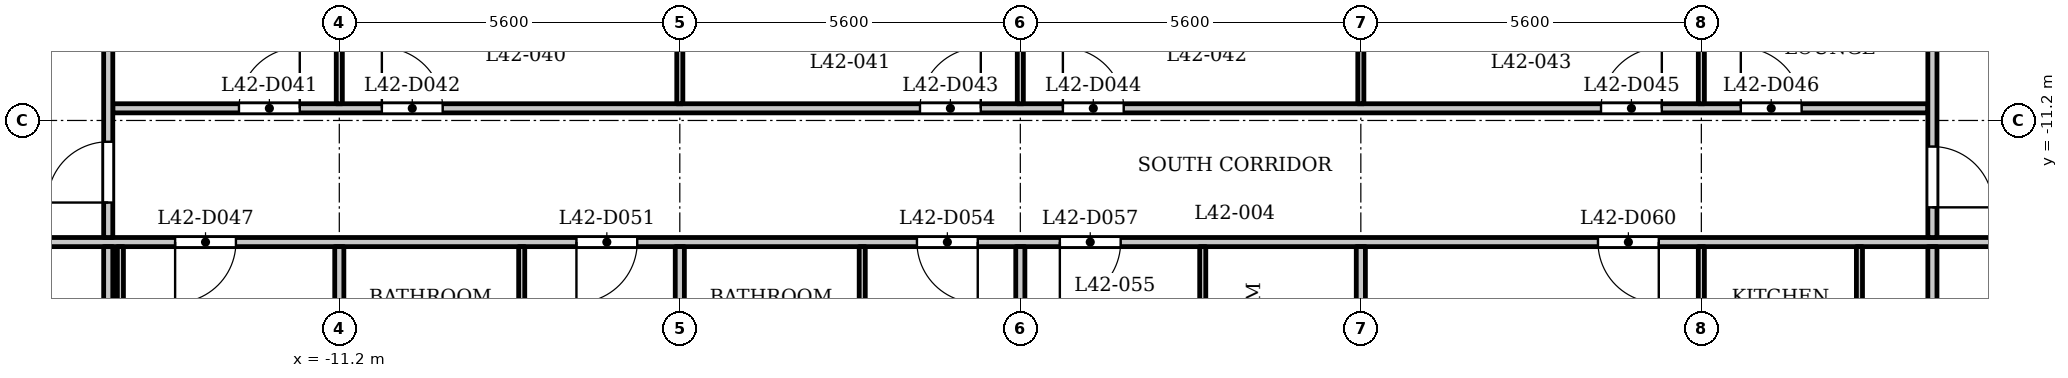
"""IFC4 building model, lengths in metres.
Left out: names, types, materials, properties, quantities, classifications, styles, units other than length and angle.
Written with IfcOpenShell. Run it as: python <this file> out.ifc"""

import sys

from ifc_helpers import new_model, si_unit, direction, frame, frame_2d, origin, place, context, subcontext, project, spatial, rectangle, extrude, element, fill, save


model = new_model("IFC4")
c1 = context("Model", 3, precision=1e-05, world=origin(), true_north=direction((0.0, 1.0)))
c2 = subcontext(c1, "Body", "Model", "MODEL_VIEW")
j1 = project(units=[si_unit("LENGTHUNIT", "METRE"), si_unit("PLANEANGLEUNIT", "RADIAN")], contexts=[c1])
p1 = place(None, origin())
s1 = spatial("IfcSite", under=j1, at=p1, CompositionType="ELEMENT")
p2 = place(p1, origin())
s2 = spatial("IfcBuilding", under=s1, at=p2, CompositionType="ELEMENT")
p3 = place(p2, frame((0.0, 0.0, 164.1)))
s3 = spatial("IfcBuildingStorey", under=s2, at=p3, CompositionType="ELEMENT", Elevation=164.1)
p4 = place(p3, frame((-17.4, -13.2, 0.0), z_axis=(0.0, 0.0, 1.0), x_axis=(1.0, 0.0, 0.0)))
e1 = element("IfcWall", 1, at=p4, inside=s3, PredefinedType="PARTITIONING", context=c2, shape_type="SweptSolid", body=[
    extrude(rectangle(XDim=34.8, YDim=0.15, at=frame_2d((17.4, 0.0))), origin(), (0.0, 0.0, 1.0), 3.2),
])
p5 = place(p4, frame((0.15, 0.0, 0.0)))
e2 = element("IfcOpeningElement", 2, at=p5, cuts=e1, PredefinedType="OPENING", context=c2, shape_type="SweptSolid", body=[
    extrude(rectangle(XDim=1.0, YDim=2.1, at=frame_2d((0.5, 1.05))), frame((0.0, 0.085, 0.0), z_axis=(0.0, -1.0, 0.0), x_axis=(1.0, 0.0, 0.0)), (0.0, 0.0, 1.0), 0.17),
])
p6 = place(p4, frame((33.55, 0.0, 0.0)))
e3 = element("IfcOpeningElement", 3, at=p6, cuts=e1, PredefinedType="OPENING", context=c2, shape_type="SweptSolid", body=[
    extrude(rectangle(XDim=1.0, YDim=2.1, at=frame_2d((0.5, 1.05))), frame((0.0, 0.085, 0.0), z_axis=(0.0, -1.0, 0.0), x_axis=(1.0, 0.0, 0.0)), (0.0, 0.0, 1.0), 0.17),
])
p7 = place(p4, frame((3.5, 0.0, 0.0)))
e4 = element("IfcOpeningElement", 4, at=p7, cuts=e1, PredefinedType="OPENING", context=c2, shape_type="SweptSolid", body=[
    extrude(rectangle(XDim=1.0, YDim=2.1, at=frame_2d((0.5, 1.05))), frame((0.0, 0.085, 0.0), z_axis=(0.0, -1.0, 0.0), x_axis=(1.0, 0.0, 0.0)), (0.0, 0.0, 1.0), 0.17),
])
p8 = place(p4, frame((10.1, 0.0, 0.0)))
e5 = element("IfcOpeningElement", 5, at=p8, cuts=e1, PredefinedType="OPENING", context=c2, shape_type="SweptSolid", body=[
    extrude(rectangle(XDim=1.0, YDim=2.1, at=frame_2d((0.5, 1.05))), frame((0.0, 0.085, 0.0), z_axis=(0.0, -1.0, 0.0), x_axis=(1.0, 0.0, 0.0)), (0.0, 0.0, 1.0), 0.17),
])
p9 = place(p4, frame((15.7, 0.0, 0.0)))
e6 = element("IfcOpeningElement", 6, at=p9, cuts=e1, PredefinedType="OPENING", context=c2, shape_type="SweptSolid", body=[
    extrude(rectangle(XDim=1.0, YDim=2.1, at=frame_2d((0.5, 1.05))), frame((0.0, 0.085, 0.0), z_axis=(0.0, -1.0, 0.0), x_axis=(1.0, 0.0, 0.0)), (0.0, 0.0, 1.0), 0.17),
])
p10 = place(p4, frame((18.05, 0.0, 0.0)))
e7 = element("IfcOpeningElement", 7, at=p10, cuts=e1, PredefinedType="OPENING", context=c2, shape_type="SweptSolid", body=[
    extrude(rectangle(XDim=1.0, YDim=2.1, at=frame_2d((0.5, 1.05))), frame((0.0, 0.085, 0.0), z_axis=(0.0, -1.0, 0.0), x_axis=(1.0, 0.0, 0.0)), (0.0, 0.0, 1.0), 0.17),
])
p11 = place(p4, frame((26.9, 0.0, 0.0)))
e8 = element("IfcOpeningElement", 8, at=p11, cuts=e1, PredefinedType="OPENING", context=c2, shape_type="SweptSolid", body=[
    extrude(rectangle(XDim=1.0, YDim=2.1, at=frame_2d((0.5, 1.05))), frame((0.0, 0.085, 0.0), z_axis=(0.0, -1.0, 0.0), x_axis=(1.0, 0.0, 0.0)), (0.0, 0.0, 1.0), 0.17),
])
p12 = place(p3, frame((-14.925, -11.0, 0.0), z_axis=(0.0, 0.0, 1.0), x_axis=(1.0, 0.0, 0.0)))
e9 = element("IfcWall", 9, at=p12, inside=s3, PredefinedType="PARTITIONING", context=c2, shape_type="SweptSolid", body=[
    extrude(rectangle(XDim=29.85, YDim=0.15, at=frame_2d((14.925, 0.0))), origin(), (0.0, 0.0, 1.0), 3.2),
])
p13 = place(p12, frame((2.075, 0.0, 0.0)))
e10 = element("IfcOpeningElement", 10, at=p13, cuts=e9, PredefinedType="OPENING", context=c2, shape_type="SweptSolid", body=[
    extrude(rectangle(XDim=1.0, YDim=2.1, at=frame_2d((0.5, 1.05))), frame((0.0, 0.085, 0.0), z_axis=(0.0, -1.0, 0.0), x_axis=(1.0, 0.0, 0.0)), (0.0, 0.0, 1.0), 0.17),
])
p14 = place(p12, frame((4.425, 0.0, 0.0)))
e11 = element("IfcOpeningElement", 11, at=p14, cuts=e9, PredefinedType="OPENING", context=c2, shape_type="SweptSolid", body=[
    extrude(rectangle(XDim=1.0, YDim=2.1, at=frame_2d((0.5, 1.05))), frame((0.0, 0.085, 0.0), z_axis=(0.0, -1.0, 0.0), x_axis=(1.0, 0.0, 0.0)), (0.0, 0.0, 1.0), 0.17),
])
p15 = place(p12, frame((13.275, 0.0, 0.0)))
e12 = element("IfcOpeningElement", 12, at=p15, cuts=e9, PredefinedType="OPENING", context=c2, shape_type="SweptSolid", body=[
    extrude(rectangle(XDim=1.0, YDim=2.1, at=frame_2d((0.5, 1.05))), frame((0.0, 0.085, 0.0), z_axis=(0.0, -1.0, 0.0), x_axis=(1.0, 0.0, 0.0)), (0.0, 0.0, 1.0), 0.17),
])
p16 = place(p12, frame((15.625, 0.0, 0.0)))
e13 = element("IfcOpeningElement", 13, at=p16, cuts=e9, PredefinedType="OPENING", context=c2, shape_type="SweptSolid", body=[
    extrude(rectangle(XDim=1.0, YDim=2.1, at=frame_2d((0.5, 1.05))), frame((0.0, 0.085, 0.0), z_axis=(0.0, -1.0, 0.0), x_axis=(1.0, 0.0, 0.0)), (0.0, 0.0, 1.0), 0.17),
])
p17 = place(p12, frame((24.475, 0.0, 0.0)))
e14 = element("IfcOpeningElement", 14, at=p17, cuts=e9, PredefinedType="OPENING", context=c2, shape_type="SweptSolid", body=[
    extrude(rectangle(XDim=1.0, YDim=2.1, at=frame_2d((0.5, 1.05))), frame((0.0, 0.085, 0.0), z_axis=(0.0, -1.0, 0.0), x_axis=(1.0, 0.0, 0.0)), (0.0, 0.0, 1.0), 0.17),
])
p18 = place(p12, frame((26.774, 0.0, 0.0)))
e15 = element("IfcOpeningElement", 15, at=p18, cuts=e9, PredefinedType="OPENING", context=c2, shape_type="SweptSolid", body=[
    extrude(rectangle(XDim=1.0, YDim=2.1, at=frame_2d((0.5, 1.05))), frame((0.0, 0.085, 0.0), z_axis=(0.0, -1.0, 0.0), x_axis=(1.0, 0.0, 0.0)), (0.0, 0.0, 1.0), 0.17),
])
p19 = place(p3, frame((-15.0, -15.325, 0.0), z_axis=(0.0, 0.0, 1.0), x_axis=(0.0, 1.0, 0.0)))
e16 = element("IfcWall", 16, at=p19, inside=s3, PredefinedType="PARTITIONING", context=c2, shape_type="SweptSolid", body=[
    extrude(rectangle(XDim=2.05, YDim=0.15, at=frame_2d((1.025, 0.0))), origin(), (0.0, 0.0, 1.0), 3.2),
])
p20 = place(p3, frame((-15.0, -13.125, 0.0), z_axis=(0.0, 0.0, 1.0), x_axis=(0.0, 1.0, 0.0)))
e17 = element("IfcWall", 17, at=p20, inside=s3, PredefinedType="PARTITIONING", context=c2, shape_type="SweptSolid", body=[
    extrude(rectangle(XDim=6.356, YDim=0.15, at=frame_2d((3.178, 0.0))), origin(), (0.0, 0.0, 1.0), 3.2),
])
p21 = place(p20, frame((0.575, 0.0, 0.0)))
e18 = element("IfcOpeningElement", 18, at=p21, cuts=e17, PredefinedType="OPENING", context=c2, shape_type="SweptSolid", body=[
    extrude(rectangle(XDim=1.0, YDim=2.1, at=frame_2d((0.5, 1.05))), frame((0.0, 0.085, 0.0), z_axis=(0.0, -1.0, 0.0), x_axis=(1.0, 0.0, 0.0)), (0.0, 0.0, 1.0), 0.17),
])
p22 = place(p3, frame((-14.8, -17.05, 0.0), z_axis=(0.0, 0.0, 1.0), x_axis=(0.0, 1.0, 0.0)))
e19 = element("IfcWall", 19, at=p22, inside=s3, PredefinedType="PARTITIONING", context=c2, shape_type="SweptSolid", body=[
    extrude(rectangle(XDim=3.775, YDim=0.1, at=frame_2d((1.888, 0.0))), origin(), (0.0, 0.0, 1.0), 3.2),
])
p23 = place(p3, frame((-11.2, -10.925, 0.0), z_axis=(0.0, 0.0, 1.0), x_axis=(0.0, 1.0, 0.0)))
e20 = element("IfcWall", 20, at=p23, inside=s3, PredefinedType="PARTITIONING", context=c2, shape_type="SweptSolid", body=[
    extrude(rectangle(XDim=3.605, YDim=0.1, at=frame_2d((1.802, 0.0))), origin(), (0.0, 0.0, 1.0), 3.2),
])
p24 = place(p3, frame((-11.2, -17.05, 0.0), z_axis=(0.0, 0.0, 1.0), x_axis=(0.0, 1.0, 0.0)))
e21 = element("IfcWall", 21, at=p24, inside=s3, PredefinedType="PARTITIONING", context=c2, shape_type="SweptSolid", body=[
    extrude(rectangle(XDim=3.775, YDim=0.15, at=frame_2d((1.888, 0.0))), origin(), (0.0, 0.0, 1.0), 3.2),
])
p25 = place(p3, frame((-8.2, -17.05, 0.0), z_axis=(0.0, 0.0, 1.0), x_axis=(0.0, 1.0, 0.0)))
e22 = element("IfcWall", 22, at=p25, inside=s3, PredefinedType="PARTITIONING", context=c2, shape_type="SweptSolid", body=[
    extrude(rectangle(XDim=3.775, YDim=0.1, at=frame_2d((1.888, 0.0))), origin(), (0.0, 0.0, 1.0), 3.2),
])
p26 = place(p3, frame((-5.6, -10.925, 0.0), z_axis=(0.0, 0.0, 1.0), x_axis=(0.0, 1.0, 0.0)))
e23 = element("IfcWall", 23, at=p26, inside=s3, PredefinedType="PARTITIONING", context=c2, shape_type="SweptSolid", body=[
    extrude(rectangle(XDim=3.605, YDim=0.1, at=frame_2d((1.802, 0.0))), origin(), (0.0, 0.0, 1.0), 3.2),
])
p27 = place(p3, frame((-5.6, -17.05, 0.0), z_axis=(0.0, 0.0, 1.0), x_axis=(0.0, 1.0, 0.0)))
e24 = element("IfcWall", 24, at=p27, inside=s3, PredefinedType="PARTITIONING", context=c2, shape_type="SweptSolid", body=[
    extrude(rectangle(XDim=3.775, YDim=0.15, at=frame_2d((1.888, 0.0))), origin(), (0.0, 0.0, 1.0), 3.2),
])
p28 = place(p3, frame((-2.6, -17.05, 0.0), z_axis=(0.0, 0.0, 1.0), x_axis=(0.0, 1.0, 0.0)))
e25 = element("IfcWall", 25, at=p28, inside=s3, PredefinedType="PARTITIONING", context=c2, shape_type="SweptSolid", body=[
    extrude(rectangle(XDim=3.775, YDim=0.1, at=frame_2d((1.888, 0.0))), origin(), (0.0, 0.0, 1.0), 3.2),
])
p29 = place(p3, frame((0.0, -10.925, 0.0), z_axis=(0.0, 0.0, 1.0), x_axis=(0.0, 1.0, 0.0)))
e26 = element("IfcWall", 26, at=p29, inside=s3, PredefinedType="PARTITIONING", context=c2, shape_type="SweptSolid", body=[
    extrude(rectangle(XDim=3.605, YDim=0.1, at=frame_2d((1.802, 0.0))), origin(), (0.0, 0.0, 1.0), 3.2),
])
p30 = place(p3, frame((0.0, -17.05, 0.0), z_axis=(0.0, 0.0, 1.0), x_axis=(0.0, 1.0, 0.0)))
e27 = element("IfcWall", 27, at=p30, inside=s3, PredefinedType="PARTITIONING", context=c2, shape_type="SweptSolid", body=[
    extrude(rectangle(XDim=3.775, YDim=0.15, at=frame_2d((1.888, 0.0))), origin(), (0.0, 0.0, 1.0), 3.2),
])
p31 = place(p3, frame((3.0, -17.05, 0.0), z_axis=(0.0, 0.0, 1.0), x_axis=(0.0, 1.0, 0.0)))
e28 = element("IfcWall", 28, at=p31, inside=s3, PredefinedType="PARTITIONING", context=c2, shape_type="SweptSolid", body=[
    extrude(rectangle(XDim=3.775, YDim=0.1, at=frame_2d((1.888, 0.0))), origin(), (0.0, 0.0, 1.0), 3.2),
])
p32 = place(p3, frame((5.6, -10.925, 0.0), z_axis=(0.0, 0.0, 1.0), x_axis=(0.0, 1.0, 0.0)))
e29 = element("IfcWall", 29, at=p32, inside=s3, PredefinedType="PARTITIONING", context=c2, shape_type="SweptSolid", body=[
    extrude(rectangle(XDim=3.605, YDim=0.1, at=frame_2d((1.802, 0.0))), origin(), (0.0, 0.0, 1.0), 3.2),
])
p33 = place(p3, frame((5.6, -17.05, 0.0), z_axis=(0.0, 0.0, 1.0), x_axis=(0.0, 1.0, 0.0)))
e30 = element("IfcWall", 30, at=p33, inside=s3, PredefinedType="PARTITIONING", context=c2, shape_type="SweptSolid", body=[
    extrude(rectangle(XDim=3.775, YDim=0.15, at=frame_2d((1.888, 0.0))), origin(), (0.0, 0.0, 1.0), 3.2),
])
p34 = place(p3, frame((11.2, -17.05, 0.0), z_axis=(0.0, 0.0, 1.0), x_axis=(0.0, 1.0, 0.0)))
e31 = element("IfcWall", 31, at=p34, inside=s3, PredefinedType="PARTITIONING", context=c2, shape_type="SweptSolid", body=[
    extrude(rectangle(XDim=3.775, YDim=0.1, at=frame_2d((1.888, 0.0))), origin(), (0.0, 0.0, 1.0), 3.2),
])
p35 = place(p34, frame((0.1, 0.0, 0.0)))
e32 = element("IfcOpeningElement", 32, at=p35, cuts=e31, PredefinedType="OPENING", context=c2, shape_type="SweptSolid", body=[
    extrude(rectangle(XDim=0.9, YDim=2.1, at=frame_2d((0.45, 1.05))), frame((0.0, 0.06, 0.0), z_axis=(0.0, -1.0, 0.0), x_axis=(1.0, 0.0, 0.0)), (0.0, 0.0, 1.0), 0.12),
])
p36 = place(p3, frame((11.2, -10.925, 0.0), z_axis=(0.0, 0.0, 1.0), x_axis=(0.0, 1.0, 0.0)))
e33 = element("IfcWall", 33, at=p36, inside=s3, PredefinedType="PARTITIONING", context=c2, shape_type="SweptSolid", body=[
    extrude(rectangle(XDim=3.605, YDim=0.1, at=frame_2d((1.802, 0.0))), origin(), (0.0, 0.0, 1.0), 3.2),
])
p37 = place(p3, frame((13.8, -17.05, 0.0), z_axis=(0.0, 0.0, 1.0), x_axis=(0.0, 1.0, 0.0)))
e34 = element("IfcWall", 34, at=p37, inside=s3, PredefinedType="PARTITIONING", context=c2, shape_type="SweptSolid", body=[
    extrude(rectangle(XDim=3.775, YDim=0.1, at=frame_2d((1.888, 0.0))), origin(), (0.0, 0.0, 1.0), 3.2),
])
p38 = place(p3, frame((15.0, -15.325, 0.0), z_axis=(0.0, 0.0, 1.0), x_axis=(0.0, 1.0, 0.0)))
e35 = element("IfcWall", 35, at=p38, inside=s3, PredefinedType="PARTITIONING", context=c2, shape_type="SweptSolid", body=[
    extrude(rectangle(XDim=2.05, YDim=0.15, at=frame_2d((1.025, 0.0))), origin(), (0.0, 0.0, 1.0), 3.2),
])
p39 = place(p3, frame((15.0, -13.125, 0.0), z_axis=(0.0, 0.0, 1.0), x_axis=(0.0, 1.0, 0.0)))
e36 = element("IfcWall", 36, at=p39, inside=s3, PredefinedType="PARTITIONING", context=c2, shape_type="SweptSolid", body=[
    extrude(rectangle(XDim=6.356, YDim=0.15, at=frame_2d((3.178, 0.0))), origin(), (0.0, 0.0, 1.0), 3.2),
])
p40 = place(p39, frame((0.496, 0.0, 0.0)))
e37 = element("IfcOpeningElement", 37, at=p40, cuts=e36, PredefinedType="OPENING", context=c2, shape_type="SweptSolid", body=[
    extrude(rectangle(XDim=1.0, YDim=2.1, at=frame_2d((0.5, 1.05))), frame((0.0, 0.085, 0.0), z_axis=(0.0, -1.0, 0.0), x_axis=(1.0, 0.0, 0.0)), (0.0, 0.0, 1.0), 0.17),
])
p41 = place(p21, origin())
e38 = element("IfcDoor", 38, at=p41, inside=s3, OperationType="SINGLE_SWING_RIGHT", PredefinedType="DOOR", context=c2, shape_type="SweptSolid", body=[
    extrude(rectangle(XDim=1.0, YDim=2.1, at=frame_2d((0.5, 1.05))), frame((0.0, 0.025, 0.0), z_axis=(0.0, -1.0, 0.0), x_axis=(1.0, 0.0, 0.0)), (0.0, 0.0, 1.0), 0.05),
])
fill(e18, e38)
p42 = place(p40, origin())
e39 = element("IfcDoor", 39, at=p42, inside=s3, OperationType="SINGLE_SWING_LEFT", PredefinedType="DOOR", context=c2, shape_type="SweptSolid", body=[
    extrude(rectangle(XDim=1.0, YDim=2.1, at=frame_2d((0.5, 1.05))), frame((0.0, 0.025, 0.0), z_axis=(0.0, -1.0, 0.0), x_axis=(1.0, 0.0, 0.0)), (0.0, 0.0, 1.0), 0.05),
])
fill(e37, e39)
p43 = place(p13, origin())
e40 = element("IfcDoor", 40, at=p43, inside=s3, OperationType="SINGLE_SWING_LEFT", PredefinedType="DOOR", context=c2, shape_type="SweptSolid", body=[
    extrude(rectangle(XDim=1.0, YDim=2.1, at=frame_2d((0.5, 1.05))), frame((0.0, 0.025, 0.0), z_axis=(0.0, -1.0, 0.0), x_axis=(1.0, 0.0, 0.0)), (0.0, 0.0, 1.0), 0.05),
])
fill(e10, e40)
p44 = place(p14, origin())
e41 = element("IfcDoor", 41, at=p44, inside=s3, OperationType="SINGLE_SWING_RIGHT", PredefinedType="DOOR", context=c2, shape_type="SweptSolid", body=[
    extrude(rectangle(XDim=1.0, YDim=2.1, at=frame_2d((0.5, 1.05))), frame((0.0, 0.025, 0.0), z_axis=(0.0, -1.0, 0.0), x_axis=(1.0, 0.0, 0.0)), (0.0, 0.0, 1.0), 0.05),
])
fill(e11, e41)
p45 = place(p15, origin())
e42 = element("IfcDoor", 42, at=p45, inside=s3, OperationType="SINGLE_SWING_LEFT", PredefinedType="DOOR", context=c2, shape_type="SweptSolid", body=[
    extrude(rectangle(XDim=1.0, YDim=2.1, at=frame_2d((0.5, 1.05))), frame((0.0, 0.025, 0.0), z_axis=(0.0, -1.0, 0.0), x_axis=(1.0, 0.0, 0.0)), (0.0, 0.0, 1.0), 0.05),
])
fill(e12, e42)
p46 = place(p16, origin())
e43 = element("IfcDoor", 43, at=p46, inside=s3, OperationType="SINGLE_SWING_RIGHT", PredefinedType="DOOR", context=c2, shape_type="SweptSolid", body=[
    extrude(rectangle(XDim=1.0, YDim=2.1, at=frame_2d((0.5, 1.05))), frame((0.0, 0.025, 0.0), z_axis=(0.0, -1.0, 0.0), x_axis=(1.0, 0.0, 0.0)), (0.0, 0.0, 1.0), 0.05),
])
fill(e13, e43)
p47 = place(p17, origin())
e44 = element("IfcDoor", 44, at=p47, inside=s3, OperationType="SINGLE_SWING_LEFT", PredefinedType="DOOR", context=c2, shape_type="SweptSolid", body=[
    extrude(rectangle(XDim=1.0, YDim=2.1, at=frame_2d((0.5, 1.05))), frame((0.0, 0.025, 0.0), z_axis=(0.0, -1.0, 0.0), x_axis=(1.0, 0.0, 0.0)), (0.0, 0.0, 1.0), 0.05),
])
fill(e14, e44)
p48 = place(p18, origin())
e45 = element("IfcDoor", 45, at=p48, inside=s3, OperationType="SINGLE_SWING_RIGHT", PredefinedType="DOOR", context=c2, shape_type="SweptSolid", body=[
    extrude(rectangle(XDim=1.0, YDim=2.1, at=frame_2d((0.5, 1.05))), frame((0.0, 0.025, 0.0), z_axis=(0.0, -1.0, 0.0), x_axis=(1.0, 0.0, 0.0)), (0.0, 0.0, 1.0), 0.05),
])
fill(e15, e45)
p49 = place(p7, origin())
e46 = element("IfcDoor", 46, at=p49, inside=s3, OperationType="SINGLE_SWING_LEFT", PredefinedType="DOOR", context=c2, shape_type="SweptSolid", body=[
    extrude(rectangle(XDim=1.0, YDim=2.1, at=frame_2d((0.5, 1.05))), frame((0.0, 0.025, 0.0), z_axis=(0.0, -1.0, 0.0), x_axis=(1.0, 0.0, 0.0)), (0.0, 0.0, 1.0), 0.05),
])
fill(e4, e46)
p50 = place(p8, origin())
e47 = element("IfcDoor", 47, at=p50, inside=s3, OperationType="SINGLE_SWING_LEFT", PredefinedType="DOOR", context=c2, shape_type="SweptSolid", body=[
    extrude(rectangle(XDim=1.0, YDim=2.1, at=frame_2d((0.5, 1.05))), frame((0.0, 0.025, 0.0), z_axis=(0.0, -1.0, 0.0), x_axis=(1.0, 0.0, 0.0)), (0.0, 0.0, 1.0), 0.05),
])
fill(e5, e47)
p51 = place(p9, origin())
e48 = element("IfcDoor", 48, at=p51, inside=s3, OperationType="SINGLE_SWING_RIGHT", PredefinedType="DOOR", context=c2, shape_type="SweptSolid", body=[
    extrude(rectangle(XDim=1.0, YDim=2.1, at=frame_2d((0.5, 1.05))), frame((0.0, 0.025, 0.0), z_axis=(0.0, -1.0, 0.0), x_axis=(1.0, 0.0, 0.0)), (0.0, 0.0, 1.0), 0.05),
])
fill(e6, e48)
p52 = place(p10, origin())
e49 = element("IfcDoor", 49, at=p52, inside=s3, OperationType="SINGLE_SWING_LEFT", PredefinedType="DOOR", context=c2, shape_type="SweptSolid", body=[
    extrude(rectangle(XDim=1.0, YDim=2.1, at=frame_2d((0.5, 1.05))), frame((0.0, 0.025, 0.0), z_axis=(0.0, -1.0, 0.0), x_axis=(1.0, 0.0, 0.0)), (0.0, 0.0, 1.0), 0.05),
])
fill(e7, e49)
p53 = place(p11, origin())
e50 = element("IfcDoor", 50, at=p53, inside=s3, OperationType="SINGLE_SWING_RIGHT", PredefinedType="DOOR", context=c2, shape_type="SweptSolid", body=[
    extrude(rectangle(XDim=1.0, YDim=2.1, at=frame_2d((0.5, 1.05))), frame((0.0, 0.025, 0.0), z_axis=(0.0, -1.0, 0.0), x_axis=(1.0, 0.0, 0.0)), (0.0, 0.0, 1.0), 0.05),
])
fill(e8, e50)
save(model, sys.argv[1])
